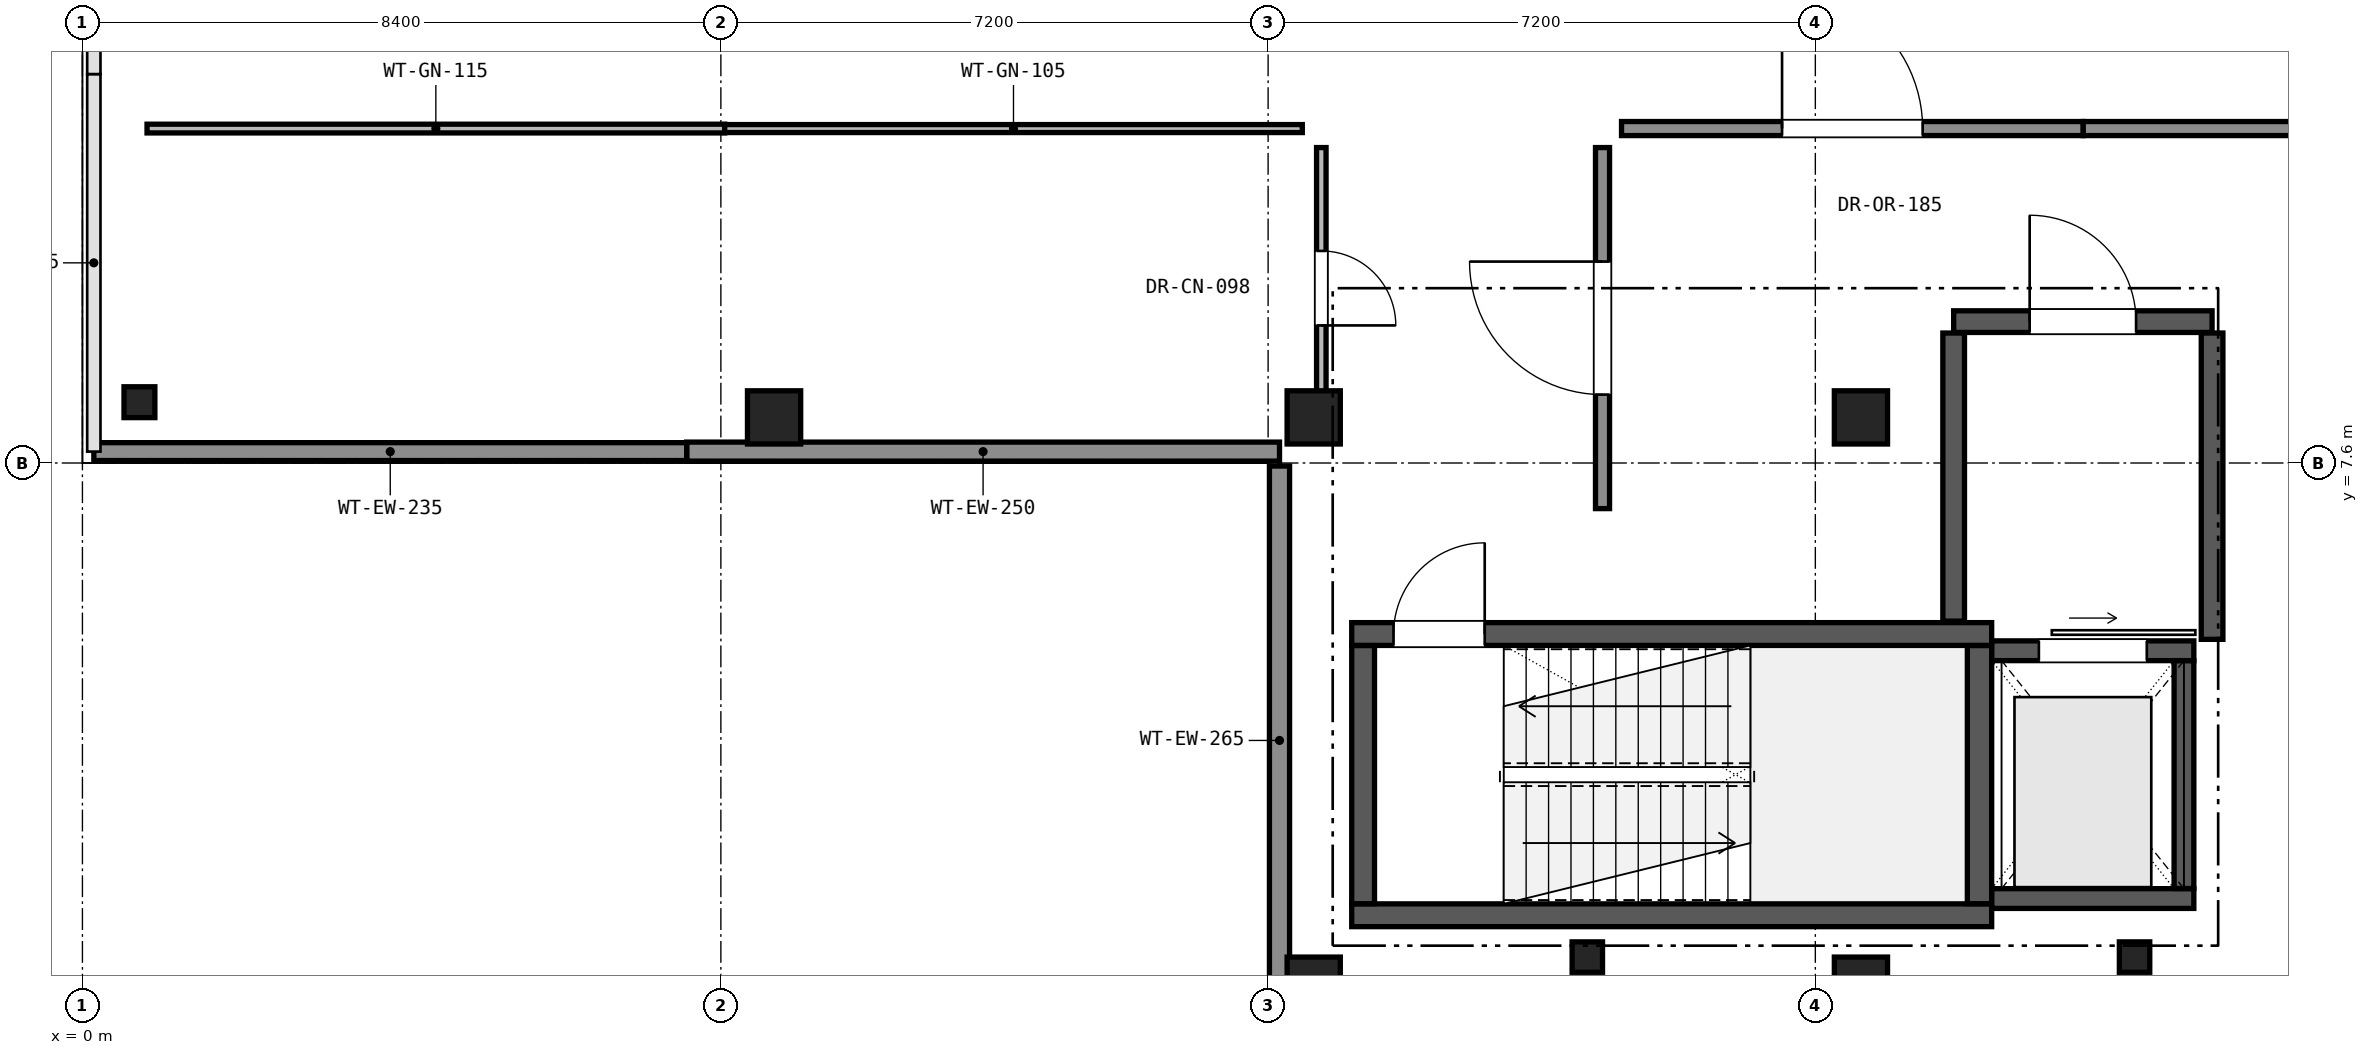
"""IFC4 building model, lengths in metres.
Left out: names, types, materials, properties, quantities, classifications, styles, units other than length and angle.
Written with IfcOpenShell. Run it as: python <this file> out.ifc"""

import sys

from ifc_helpers import new_model, si_unit, direction, frame, frame_2d, origin, origin_2d, place, context, subcontext, project, spatial, rectangle, hollow_circle, extrude, element, fill, save


model = new_model("IFC4")
c1 = context("Model", 3, precision=1e-05, world=origin(), true_north=direction((0.0, 1.0)))
c2 = subcontext(c1, "Body", "Model", "MODEL_VIEW")
j1 = project(units=[si_unit("LENGTHUNIT", "METRE"), si_unit("PLANEANGLEUNIT", "RADIAN")], contexts=[c1])
p1 = place(None, origin())
s1 = spatial("IfcSite", under=j1, at=p1, CompositionType="ELEMENT")
p2 = place(p1, origin())
s2 = spatial("IfcBuilding", under=s1, at=p2, CompositionType="ELEMENT")
p3 = place(p2, frame((0.0, 0.0, 9.52)))
s3 = spatial("IfcBuildingStorey", under=s2, at=p3, CompositionType="ELEMENT", Elevation=9.52)
p4 = place(p3, frame((0.75, 8.4, 0.0), z_axis=(0.0, 0.0, 1.0), x_axis=(1.0, 0.0, 0.0)))
e1 = element("IfcColumn", 1, at=p4, inside=s3, PredefinedType="COLUMN", context=c2, shape_type="SweptSolid", body=[
    extrude(hollow_circle(Radius=0.203, WallThickness=0.016, at=origin_2d()), origin(), (0.0, 0.0, 1.0), 4.08),
])
for number, where, z_axis, x_axis in (
    (2, (9.1, 8.2, 0.0), (0.0, 0.0, 1.0), (1.0, 0.0, 0.0)),
    (3, (16.2, 0.75, 0.0), (0.0, 0.0, 1.0), (1.0, 0.0, 0.0)),
    (4, (16.2, 8.2, 0.0), (0.0, 0.0, 1.0), (1.0, 0.0, 0.0)),
    (5, (23.4, 0.75, 0.0), (0.0, 0.0, 1.0), (1.0, 0.0, 0.0)),
    (6, (23.4, 8.2, 0.0), (0.0, 0.0, 1.0), (1.0, 0.0, 0.0)),
):
    element("IfcColumn", number, at=place(p3, frame(where, z_axis=z_axis, x_axis=x_axis)), inside=s3, PredefinedType="COLUMN", context=c2, shape_type="SweptSolid", body=[
        extrude(rectangle(XDim=0.7, YDim=0.7, at=origin_2d()), origin(), (0.0, 0.0, 1.0), 4.08),
    ])
for number, where, z_axis, x_axis in (
    (7, (19.8, 1.1, 0.0), (0.0, 0.0, 1.0), (1.0, 0.0, 0.0)),
    (8, (27.0, 1.1, 0.0), (0.0, 0.0, 1.0), (1.0, 0.0, 0.0)),
):
    element("IfcColumn", number, at=place(p3, frame(where, z_axis=z_axis, x_axis=x_axis)), inside=s3, PredefinedType="PILASTER", context=c2, shape_type="SweptSolid", body=[
        extrude(rectangle(XDim=0.4, YDim=0.4, at=origin_2d()), origin(), (0.0, 0.0, 1.0), 4.08),
    ])
p5 = place(p3, frame((15.75, 0.34, 0.0), z_axis=(0.0, 0.0, 1.0), x_axis=(0.0, 1.0, 0.0)))
e9 = element("IfcWall", 9, at=p5, inside=s3, PredefinedType="SOLIDWALL", context=c2, shape_type="SweptSolid", body=[
    extrude(rectangle(XDim=7.22, YDim=0.265, at=frame_2d((3.61, 0.0))), origin(), (0.0, 0.0, 1.0), 3.735),
])
p6 = place(p3, frame((15.75, 7.75, 0.0), z_axis=(0.0, 0.0, 1.0), x_axis=(-1.0, 0.0, 0.0)))
e10 = element("IfcWall", 10, at=p6, inside=s3, PredefinedType="SOLIDWALL", context=c2, shape_type="SweptSolid", body=[
    extrude(rectangle(XDim=7.8, YDim=0.25, at=frame_2d((3.9, 0.0))), origin(), (0.0, 0.0, 1.0), 3.735),
])
p7 = place(p3, frame((7.95, 7.75, 0.0), z_axis=(0.0, 0.0, 1.0), x_axis=(-1.0, 0.0, 0.0)))
e11 = element("IfcWall", 11, at=p7, inside=s3, PredefinedType="SOLIDWALL", context=c2, shape_type="SweptSolid", body=[
    extrude(rectangle(XDim=7.8, YDim=0.235, at=frame_2d((3.9, 0.0))), origin(), (0.0, 0.0, 1.0), 3.735),
])
p8 = place(p3, frame((16.7, 1.65, 0.0), z_axis=(0.0, 0.0, 1.0), x_axis=(1.0, 0.0, 0.0)))
e12 = element("IfcWall", 12, at=p8, inside=s3, PredefinedType="SHEAR", context=c2, shape_type="SweptSolid", body=[
    extrude(rectangle(XDim=8.42, YDim=0.3, at=frame_2d((4.21, 0.0))), origin(), (0.0, 0.0, 1.0), 3.735),
])
p9 = place(p3, frame((16.7, 5.35, 0.0), z_axis=(0.0, 0.0, 1.0), x_axis=(1.0, 0.0, 0.0)))
e13 = element("IfcWall", 13, at=p9, inside=s3, PredefinedType="SHEAR", context=c2, shape_type="SweptSolid", body=[
    extrude(rectangle(XDim=8.42, YDim=0.3, at=frame_2d((4.21, 0.0))), origin(), (0.0, 0.0, 1.0), 3.735),
])
p10 = place(p9, frame((0.55, 0.0, 0.0)))
e14 = element("IfcOpeningElement", 14, at=p10, cuts=e13, PredefinedType="OPENING", context=c2, shape_type="SweptSolid", body=[
    extrude(rectangle(XDim=1.2, YDim=2.2, at=frame_2d((0.6, 1.1))), frame((0.0, 0.16, 0.0), z_axis=(0.0, -1.0, 0.0), x_axis=(1.0, 0.0, 0.0)), (0.0, 0.0, 1.0), 0.32),
])
p11 = place(p3, frame((16.85, 1.802, 0.0), z_axis=(0.0, 0.0, 1.0), x_axis=(0.0, 1.0, 0.0)))
e15 = element("IfcWall", 15, at=p11, inside=s3, PredefinedType="SHEAR", context=c2, shape_type="SweptSolid", body=[
    extrude(rectangle(XDim=3.396, YDim=0.3, at=frame_2d((1.698, 0.0))), origin(), (0.0, 0.0, 1.0), 3.735),
])
p12 = place(p3, frame((24.96, 1.802, 0.0), z_axis=(0.0, 0.0, 1.0), x_axis=(0.0, 1.0, 0.0)))
e16 = element("IfcWall", 16, at=p12, inside=s3, PredefinedType="SHEAR", context=c2, shape_type="SweptSolid", body=[
    extrude(rectangle(XDim=3.396, YDim=0.32, at=frame_2d((1.698, 0.0))), origin(), (0.0, 0.0, 1.0), 3.735),
])
p13 = place(p3, frame((25.122, 1.87, 0.0), z_axis=(0.0, 0.0, 1.0), x_axis=(1.0, 0.0, 0.0)))
e17 = element("IfcWall", 17, at=p13, inside=s3, PredefinedType="SHEAR", context=c2, shape_type="SweptSolid", body=[
    extrude(rectangle(XDim=2.658, YDim=0.26, at=frame_2d((1.329, 0.0))), origin(), (0.0, 0.0, 1.0), 3.735),
])
p14 = place(p3, frame((25.122, 5.13, 0.0), z_axis=(0.0, 0.0, 1.0), x_axis=(1.0, 0.0, 0.0)))
e18 = element("IfcWall", 18, at=p14, inside=s3, PredefinedType="SHEAR", context=c2, shape_type="SweptSolid", body=[
    extrude(rectangle(XDim=2.658, YDim=0.26, at=frame_2d((1.329, 0.0))), origin(), (0.0, 0.0, 1.0), 3.735),
])
p15 = place(p14, frame((0.619, 0.0, 0.0)))
e19 = element("IfcOpeningElement", 19, at=p15, cuts=e18, PredefinedType="OPENING", context=c2, shape_type="SweptSolid", body=[
    extrude(rectangle(XDim=1.42, YDim=2.25, at=frame_2d((0.71, 1.125))), frame((0.0, 0.14, 0.0), z_axis=(0.0, -1.0, 0.0), x_axis=(1.0, 0.0, 0.0)), (0.0, 0.0, 1.0), 0.28),
])
p16 = place(p3, frame((27.65, 2.002, 0.0), z_axis=(0.0, 0.0, 1.0), x_axis=(0.0, 1.0, 0.0)))
e20 = element("IfcWall", 20, at=p16, inside=s3, PredefinedType="SHEAR", context=c2, shape_type="SweptSolid", body=[
    extrude(rectangle(XDim=2.996, YDim=0.26, at=frame_2d((1.498, 0.0))), origin(), (0.0, 0.0, 1.0), 3.735),
])
p17 = place(p3, frame((24.62, 9.46, 0.0), z_axis=(0.0, 0.0, 1.0), x_axis=(1.0, 0.0, 0.0)))
e21 = element("IfcWall", 21, at=p17, inside=s3, PredefinedType="SHEAR", context=c2, shape_type="SweptSolid", body=[
    extrude(rectangle(XDim=3.4, YDim=0.285, at=frame_2d((1.7, 0.0))), origin(), (0.0, 0.0, 1.0), 3.735),
])
p18 = place(p17, frame((1.0, 0.0, 0.0)))
e22 = element("IfcOpeningElement", 22, at=p18, cuts=e21, PredefinedType="OPENING", context=c2, shape_type="SweptSolid", body=[
    extrude(rectangle(XDim=1.4, YDim=2.25, at=frame_2d((0.7, 1.125))), frame((0.0, 0.152, 0.0), z_axis=(0.0, -1.0, 0.0), x_axis=(1.0, 0.0, 0.0)), (0.0, 0.0, 1.0), 0.305),
])
p19 = place(p3, frame((24.62, 5.52, 0.0), z_axis=(0.0, 0.0, 1.0), x_axis=(0.0, 1.0, 0.0)))
e23 = element("IfcWall", 23, at=p19, inside=s3, PredefinedType="SHEAR", context=c2, shape_type="SweptSolid", body=[
    extrude(rectangle(XDim=3.79, YDim=0.285, at=frame_2d((1.895, 0.0))), origin(), (0.0, 0.0, 1.0), 2.785),
])
p20 = place(p3, frame((28.02, 5.28, 0.0), z_axis=(0.0, 0.0, 1.0), x_axis=(0.0, 1.0, 0.0)))
e24 = element("IfcWall", 24, at=p20, inside=s3, PredefinedType="SHEAR", context=c2, shape_type="SweptSolid", body=[
    extrude(rectangle(XDim=4.03, YDim=0.285, at=frame_2d((2.015, 0.0))), origin(), (0.0, 0.0, 1.0), 2.785),
])
p21 = place(p3, frame((20.0, 7.0, 0.0), z_axis=(0.0, 0.0, 1.0), x_axis=(0.0, 1.0, 0.0)))
e25 = element("IfcWall", 25, at=p21, inside=s3, PredefinedType="PARTITIONING", context=c2, shape_type="SweptSolid", body=[
    extrude(rectangle(XDim=4.75, YDim=0.185, at=frame_2d((2.375, 0.0))), origin(), (0.0, 0.0, 1.0), 2.785),
])
p22 = place(p21, frame((1.5, 0.0, 0.0)))
e26 = element("IfcOpeningElement", 26, at=p22, cuts=e25, PredefinedType="OPENING", context=c2, shape_type="SweptSolid", body=[
    extrude(rectangle(XDim=1.75, YDim=2.4, at=frame_2d((0.875, 1.2))), frame((0.0, 0.103, 0.0), z_axis=(0.0, -1.0, 0.0), x_axis=(1.0, 0.0, 0.0)), (0.0, 0.0, 1.0), 0.205),
])
p23 = place(p3, frame((20.25, 12.0, 0.0), z_axis=(0.0, 0.0, 1.0), x_axis=(1.0, 0.0, 0.0)))
e27 = element("IfcWall", 27, at=p23, inside=s3, PredefinedType="PARTITIONING", context=c2, shape_type="SweptSolid", body=[
    extrude(rectangle(XDim=6.075, YDim=0.185, at=frame_2d((3.038, 0.0))), origin(), (0.0, 0.0, 1.0), 3.035),
])
p24 = place(p23, frame((2.112, 0.0, 0.0)))
e28 = element("IfcOpeningElement", 28, at=p24, cuts=e27, PredefinedType="OPENING", context=c2, shape_type="SweptSolid", body=[
    extrude(rectangle(XDim=1.85, YDim=2.4, at=frame_2d((0.925, 1.2))), frame((0.0, 0.103, 0.0), z_axis=(0.0, -1.0, 0.0), x_axis=(1.0, 0.0, 0.0)), (0.0, 0.0, 1.0), 0.205),
])
p25 = place(p3, frame((26.325, 12.0, 0.0), z_axis=(0.0, 0.0, 1.0), x_axis=(1.0, 0.0, 0.0)))
e29 = element("IfcWall", 29, at=p25, inside=s3, PredefinedType="PARTITIONING", context=c2, shape_type="SweptSolid", body=[
    extrude(rectangle(XDim=6.075, YDim=0.185, at=frame_2d((3.038, 0.0))), origin(), (0.0, 0.0, 1.0), 3.185),
])
p26 = place(p3, frame((16.3, 11.75, 0.0), z_axis=(0.0, 0.0, 1.0), x_axis=(0.0, -1.0, 0.0)))
e30 = element("IfcWall", 30, at=p26, inside=s3, PredefinedType="PARTITIONING", context=c2, shape_type="SweptSolid", body=[
    extrude(rectangle(XDim=3.7, YDim=0.125, at=frame_2d((1.85, 0.0))), origin(), (0.0, 0.0, 1.0), 2.785),
])
p27 = place(p26, frame((1.36, 0.0, 0.0)))
e31 = element("IfcOpeningElement", 31, at=p27, cuts=e30, PredefinedType="OPENING", context=c2, shape_type="SweptSolid", body=[
    extrude(rectangle(XDim=0.98, YDim=2.15, at=frame_2d((0.49, 1.075))), frame((0.0, 0.073, 0.0), z_axis=(0.0, -1.0, 0.0), x_axis=(1.0, 0.0, 0.0)), (0.0, 0.0, 1.0), 0.145),
])
p28 = place(p3, frame((0.85, 12.0, 0.0), z_axis=(0.0, 0.0, 1.0), x_axis=(1.0, 0.0, 0.0)))
e32 = element("IfcWall", 32, at=p28, inside=s3, PredefinedType="PARTITIONING", context=c2, shape_type="SweptSolid", body=[
    extrude(rectangle(XDim=7.6, YDim=0.115, at=frame_2d((3.8, 0.0))), origin(), (0.0, 0.0, 1.0), 3.325),
])
p29 = place(p3, frame((8.45, 12.0, 0.0), z_axis=(0.0, 0.0, 1.0), x_axis=(1.0, 0.0, 0.0)))
e33 = element("IfcWall", 33, at=p29, inside=s3, PredefinedType="PARTITIONING", context=c2, shape_type="SweptSolid", body=[
    extrude(rectangle(XDim=7.6, YDim=0.105, at=frame_2d((3.8, 0.0))), origin(), (0.0, 0.0, 1.0), 2.985),
])
p30 = place(p10, origin())
e34 = element("IfcDoor", 34, at=p30, inside=s3, OperationType="SINGLE_SWING_RIGHT", PredefinedType="DOOR", context=c2, shape_type="SweptSolid", body=[
    extrude(rectangle(XDim=1.2, YDim=2.2, at=frame_2d((0.6, 1.1))), frame((0.0, 0.025, 0.0), z_axis=(0.0, -1.0, 0.0), x_axis=(1.0, 0.0, 0.0)), (0.0, 0.0, 1.0), 0.05),
])
fill(e14, e34)
p31 = place(p15, origin())
e35 = element("IfcDoor", 35, at=p31, inside=s3, OperationType="SLIDING_TO_RIGHT", PredefinedType="DOOR", context=c2, shape_type="SweptSolid", body=[
    extrude(rectangle(XDim=1.42, YDim=2.25, at=frame_2d((0.71, 1.125))), frame((0.0, 0.025, 0.0), z_axis=(0.0, -1.0, 0.0), x_axis=(1.0, 0.0, 0.0)), (0.0, 0.0, 1.0), 0.05),
])
fill(e19, e35)
p32 = place(p18, origin())
e36 = element("IfcDoor", 36, at=p32, inside=s3, OperationType="SINGLE_SWING_LEFT", PredefinedType="DOOR", context=c2, shape_type="SweptSolid", body=[
    extrude(rectangle(XDim=1.4, YDim=2.25, at=frame_2d((0.7, 1.125))), frame((0.0, 0.025, 0.0), z_axis=(0.0, -1.0, 0.0), x_axis=(1.0, 0.0, 0.0)), (0.0, 0.0, 1.0), 0.05),
])
fill(e22, e36)
p33 = place(p22, origin())
e37 = element("IfcDoor", 37, at=p33, inside=s3, OperationType="SINGLE_SWING_RIGHT", PredefinedType="DOOR", context=c2, shape_type="SweptSolid", body=[
    extrude(rectangle(XDim=1.75, YDim=2.4, at=frame_2d((0.875, 1.2))), frame((0.0, 0.025, 0.0), z_axis=(0.0, -1.0, 0.0), x_axis=(1.0, 0.0, 0.0)), (0.0, 0.0, 1.0), 0.05),
])
fill(e26, e37)
p34 = place(p24, origin())
e38 = element("IfcDoor", 38, at=p34, inside=s3, OperationType="SINGLE_SWING_LEFT", PredefinedType="DOOR", context=c2, shape_type="SweptSolid", body=[
    extrude(rectangle(XDim=1.85, YDim=2.4, at=frame_2d((0.925, 1.2))), frame((0.0, 0.025, 0.0), z_axis=(0.0, -1.0, 0.0), x_axis=(1.0, 0.0, 0.0)), (0.0, 0.0, 1.0), 0.05),
])
fill(e28, e38)
p35 = place(p27, origin())
e39 = element("IfcDoor", 39, at=p35, inside=s3, OperationType="SINGLE_SWING_RIGHT", PredefinedType="DOOR", context=c2, shape_type="SweptSolid", body=[
    extrude(rectangle(XDim=0.98, YDim=2.15, at=frame_2d((0.49, 1.075))), frame((0.0, 0.025, 0.0), z_axis=(0.0, -1.0, 0.0), x_axis=(1.0, 0.0, 0.0)), (0.0, 0.0, 1.0), 0.05),
])
fill(e31, e39)
save(model, sys.argv[1])
